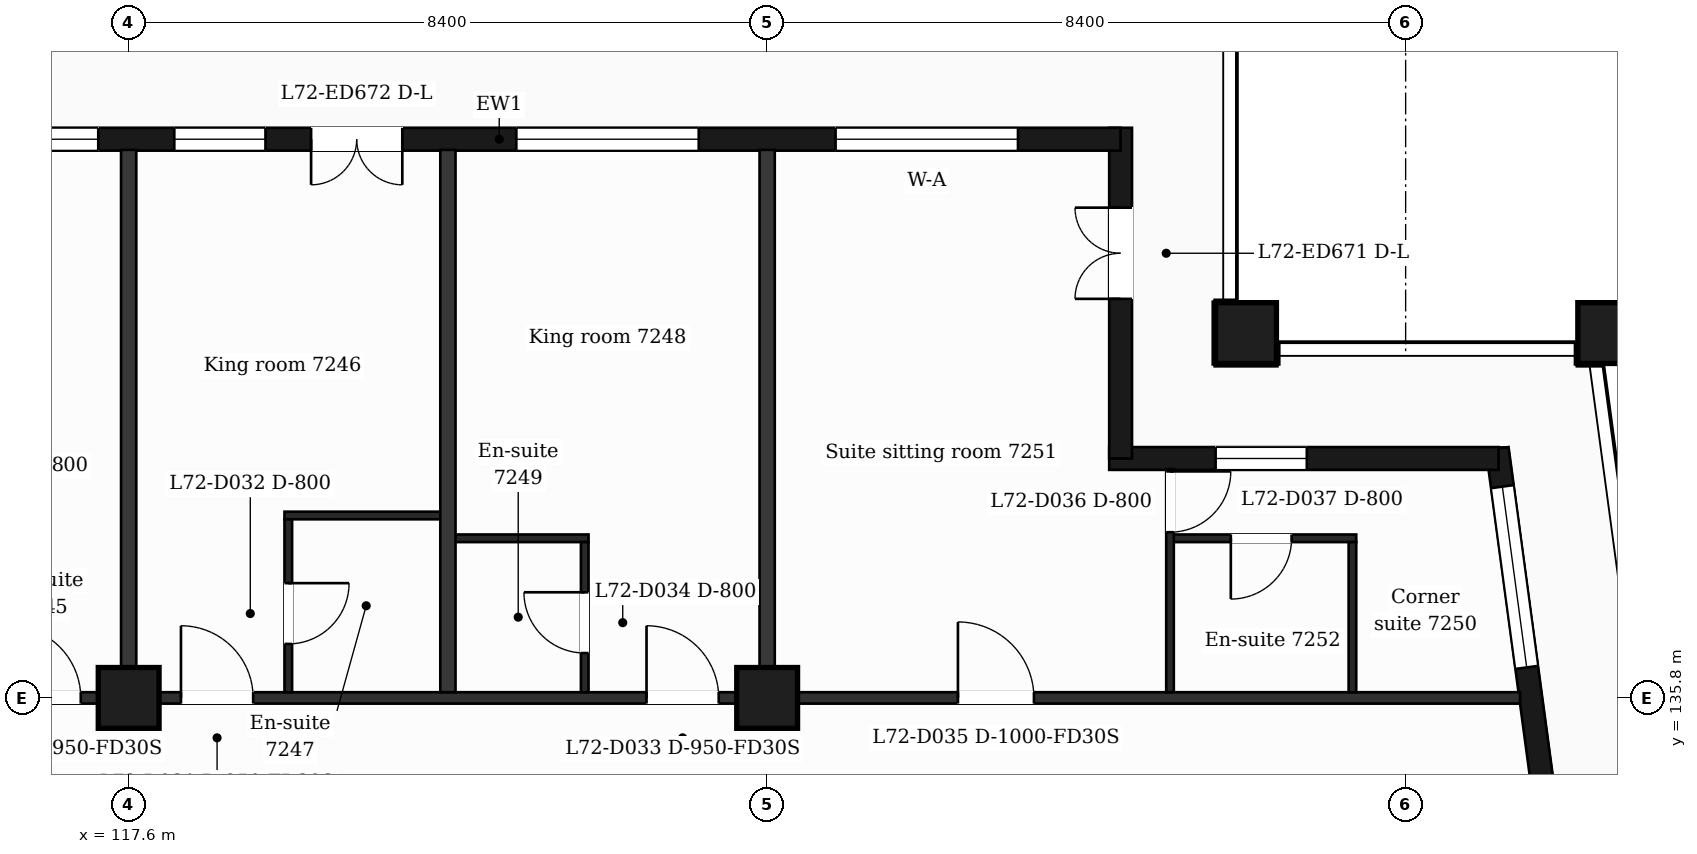
"""IFC4 building model, lengths in metres.
Left out: names, types, materials, properties, quantities, classifications, styles, units other than length and angle.
Written with IfcOpenShell. Run it as: python <this file> out.ifc"""

import sys

from ifc_helpers import new_model, si_unit, direction, frame, frame_2d, origin, origin_2d, place, context, subcontext, project, spatial, rectangle, extrude, element, fill, save


model = new_model("IFC4")
c1 = context("Model", 3, precision=1e-05, world=origin(), true_north=direction((0.0, 1.0)))
c2 = subcontext(c1, "Body", "Model", "MODEL_VIEW")
j1 = project(units=[si_unit("LENGTHUNIT", "METRE"), si_unit("PLANEANGLEUNIT", "RADIAN")], contexts=[c1])
p1 = place(None, origin())
s1 = spatial("IfcSite", under=j1, at=p1, CompositionType="ELEMENT")
p2 = place(p1, origin())
s2 = spatial("IfcBuilding", under=s1, at=p2, CompositionType="ELEMENT")
p3 = place(p2, frame((0.0, 0.0, 296.0)))
s3 = spatial("IfcBuildingStorey", under=s2, at=p3, CompositionType="ELEMENT", Elevation=296.0)
for number, where, z_axis, x_axis in (
    (1, (132.3, 140.6, 0.0), (0.0, 0.0, 1.0), (1.0, 0.0, 0.0)),
    (2, (137.065, 140.6, 0.0), (0.0, 0.0, 1.0), (1.0, 0.0, 0.0)),
    (3, (117.6, 135.8, 0.0), (0.0, 0.0, 1.0), (1.0, 0.0, 0.0)),
    (4, (126.0, 135.8, 0.0), (0.0, 0.0, 1.0), (1.0, 0.0, 0.0)),
):
    element("IfcColumn", number, at=place(p3, frame(where, z_axis=z_axis, x_axis=x_axis)), inside=s3, PredefinedType="COLUMN", context=c2, shape_type="SweptSolid", body=[
        extrude(rectangle(XDim=0.8, YDim=0.8, at=origin_2d()), origin(), (0.0, 0.0, 1.0), 3.7),
    ])
p4 = place(p3, frame((136.504, 132.4, 0.0), z_axis=(0.0, 0.0, 1.0), x_axis=(-0.133399697462, 0.99106231929, 0.0)))
e5 = element("IfcWall", 5, at=p4, inside=s3, PredefinedType="SOLIDWALL", context=c2, shape_type="SweptSolid", body=[
    extrude(rectangle(XDim=6.74, YDim=0.3, at=frame_2d((3.37, 0.0))), origin(), (0.0, 0.0, 1.0), 3.38),
])
p5 = place(p4, frame((1.115, 0.0, 0.0)))
e6 = element("IfcOpeningElement", 6, at=p5, cuts=e5, PredefinedType="OPENING", context=c2, shape_type="SweptSolid", body=[
    extrude(rectangle(XDim=1.2, YDim=2.4, at=frame_2d((0.6, 1.2))), frame((0.0, 0.16, 0.0), z_axis=(0.0, -1.0, 0.0), x_axis=(1.0, 0.0, 0.0)), (0.0, 0.0, 1.0), 0.32),
])
p6 = place(p4, frame((3.835, 0.0, 0.9)))
e7 = element("IfcOpeningElement", 7, at=p6, cuts=e5, PredefinedType="OPENING", context=c2, shape_type="SweptSolid", body=[
    extrude(rectangle(XDim=2.4, YDim=2.1, at=frame_2d((1.2, 1.05))), frame((0.0, 0.16, 0.0), z_axis=(0.0, -1.0, 0.0), x_axis=(1.0, 0.0, 0.0)), (0.0, 0.0, 1.0), 0.32),
])
p7 = place(p3, frame((135.623, 138.95, 0.0), z_axis=(0.0, 0.0, 1.0), x_axis=(-1.0, 0.0, 0.0)))
e8 = element("IfcWall", 8, at=p7, inside=s3, PredefinedType="SOLIDWALL", context=c2, shape_type="SweptSolid", body=[
    extrude(rectangle(XDim=5.123, YDim=0.3, at=frame_2d((2.561, 0.0))), origin(), (0.0, 0.0, 1.0), 3.38),
])
p8 = place(p7, frame((2.523, 0.0, 0.9)))
e9 = element("IfcOpeningElement", 9, at=p8, cuts=e8, PredefinedType="OPENING", context=c2, shape_type="SweptSolid", body=[
    extrude(rectangle(XDim=1.2, YDim=2.1, at=frame_2d((0.6, 1.05))), frame((0.0, 0.16, 0.0), z_axis=(0.0, -1.0, 0.0), x_axis=(1.0, 0.0, 0.0)), (0.0, 0.0, 1.0), 0.32),
])
p9 = place(p3, frame((130.65, 138.95, 0.0), z_axis=(0.0, 0.0, 1.0), x_axis=(0.0, 1.0, 0.0)))
e10 = element("IfcWall", 10, at=p9, inside=s3, PredefinedType="SOLIDWALL", context=c2, shape_type="SweptSolid", body=[
    extrude(rectangle(XDim=4.35, YDim=0.3, at=frame_2d((2.175, 0.0))), origin(), (0.0, 0.0, 1.0), 3.38),
])
p10 = place(p9, frame((2.1, 0.0, 0.0)))
e11 = element("IfcOpeningElement", 11, at=p10, cuts=e10, PredefinedType="OPENING", context=c2, shape_type="SweptSolid", body=[
    extrude(rectangle(XDim=1.2, YDim=2.4, at=frame_2d((0.6, 1.2))), frame((0.0, 0.16, 0.0), z_axis=(0.0, -1.0, 0.0), x_axis=(1.0, 0.0, 0.0)), (0.0, 0.0, 1.0), 0.32),
])
p11 = place(p3, frame((130.65, 143.15, 0.0), z_axis=(0.0, 0.0, 1.0), x_axis=(-1.0, 0.0, 0.0)))
e12 = element("IfcWall", 12, at=p11, inside=s3, PredefinedType="SOLIDWALL", context=c2, shape_type="SweptSolid", body=[
    extrude(rectangle(XDim=16.35, YDim=0.3, at=frame_2d((8.175, 0.0))), origin(), (0.0, 0.0, 1.0), 3.38),
])
p12 = place(p11, frame((1.35, 0.0, 0.9)))
e13 = element("IfcOpeningElement", 13, at=p12, cuts=e12, PredefinedType="OPENING", context=c2, shape_type="SweptSolid", body=[
    extrude(rectangle(XDim=2.4, YDim=2.1, at=frame_2d((1.2, 1.05))), frame((0.0, 0.16, 0.0), z_axis=(0.0, -1.0, 0.0), x_axis=(1.0, 0.0, 0.0)), (0.0, 0.0, 1.0), 0.32),
])
p13 = place(p11, frame((5.55, 0.0, 0.9)))
e14 = element("IfcOpeningElement", 14, at=p13, cuts=e12, PredefinedType="OPENING", context=c2, shape_type="SweptSolid", body=[
    extrude(rectangle(XDim=2.4, YDim=2.1, at=frame_2d((1.2, 1.05))), frame((0.0, 0.16, 0.0), z_axis=(0.0, -1.0, 0.0), x_axis=(1.0, 0.0, 0.0)), (0.0, 0.0, 1.0), 0.32),
])
p14 = place(p11, frame((9.45, 0.0, 0.0)))
e15 = element("IfcOpeningElement", 15, at=p14, cuts=e12, PredefinedType="OPENING", context=c2, shape_type="SweptSolid", body=[
    extrude(rectangle(XDim=1.2, YDim=2.4, at=frame_2d((0.6, 1.2))), frame((0.0, 0.16, 0.0), z_axis=(0.0, -1.0, 0.0), x_axis=(1.0, 0.0, 0.0)), (0.0, 0.0, 1.0), 0.32),
])
p15 = place(p11, frame((11.25, 0.0, 0.9)))
e16 = element("IfcOpeningElement", 16, at=p15, cuts=e12, PredefinedType="OPENING", context=c2, shape_type="SweptSolid", body=[
    extrude(rectangle(XDim=1.2, YDim=2.1, at=frame_2d((0.6, 1.05))), frame((0.0, 0.16, 0.0), z_axis=(0.0, -1.0, 0.0), x_axis=(1.0, 0.0, 0.0)), (0.0, 0.0, 1.0), 0.32),
])
p16 = place(p11, frame((13.45, 0.0, 0.9)))
e17 = element("IfcOpeningElement", 17, at=p16, cuts=e12, PredefinedType="OPENING", context=c2, shape_type="SweptSolid", body=[
    extrude(rectangle(XDim=2.4, YDim=2.1, at=frame_2d((1.2, 1.05))), frame((0.0, 0.16, 0.0), z_axis=(0.0, -1.0, 0.0), x_axis=(1.0, 0.0, 0.0)), (0.0, 0.0, 1.0), 0.32),
])
p17 = place(p3, frame((90.895, 135.8, 0.0), z_axis=(0.0, 0.0, 1.0), x_axis=(1.0, 0.0, 0.0)))
e18 = element("IfcWall", 18, at=p17, inside=s3, PredefinedType="PARTITIONING", context=c2, shape_type="SweptSolid", body=[
    extrude(rectangle(XDim=45.011, YDim=0.15, at=frame_2d((22.505, 0.0))), origin(), (0.0, 0.0, 1.0), 3.38),
])
p18 = place(p17, frame((6.906, 0.0, 0.0)))
e19 = element("IfcOpeningElement", 19, at=p18, cuts=e18, PredefinedType="OPENING", context=c2, shape_type="SweptSolid", body=[
    extrude(rectangle(XDim=1.0, YDim=2.1, at=frame_2d((0.5, 1.05))), frame((0.0, 0.085, 0.0), z_axis=(0.0, -1.0, 0.0), x_axis=(1.0, 0.0, 0.0)), (0.0, 0.0, 1.0), 0.17),
])
p19 = place(p17, frame((10.555, 0.0, 0.0)))
e20 = element("IfcOpeningElement", 20, at=p19, cuts=e18, PredefinedType="OPENING", context=c2, shape_type="SweptSolid", body=[
    extrude(rectangle(XDim=1.0, YDim=2.1, at=frame_2d((0.5, 1.05))), frame((0.0, 0.085, 0.0), z_axis=(0.0, -1.0, 0.0), x_axis=(1.0, 0.0, 0.0)), (0.0, 0.0, 1.0), 0.17),
])
p20 = place(p17, frame((16.719, 0.0, 0.0)))
e21 = element("IfcOpeningElement", 21, at=p20, cuts=e18, PredefinedType="OPENING", context=c2, shape_type="SweptSolid", body=[
    extrude(rectangle(XDim=0.95, YDim=2.1, at=frame_2d((0.475, 1.05))), frame((0.0, 0.085, 0.0), z_axis=(0.0, -1.0, 0.0), x_axis=(1.0, 0.0, 0.0)), (0.0, 0.0, 1.0), 0.17),
])
p21 = place(p17, frame((21.281, 0.0, 0.0)))
e22 = element("IfcOpeningElement", 22, at=p21, cuts=e18, PredefinedType="OPENING", context=c2, shape_type="SweptSolid", body=[
    extrude(rectangle(XDim=0.95, YDim=2.1, at=frame_2d((0.475, 1.05))), frame((0.0, 0.085, 0.0), z_axis=(0.0, -1.0, 0.0), x_axis=(1.0, 0.0, 0.0)), (0.0, 0.0, 1.0), 0.17),
])
p22 = place(p17, frame((25.125, 0.0, 0.0)))
e23 = element("IfcOpeningElement", 23, at=p22, cuts=e18, PredefinedType="OPENING", context=c2, shape_type="SweptSolid", body=[
    extrude(rectangle(XDim=0.95, YDim=2.1, at=frame_2d((0.475, 1.05))), frame((0.0, 0.085, 0.0), z_axis=(0.0, -1.0, 0.0), x_axis=(1.0, 0.0, 0.0)), (0.0, 0.0, 1.0), 0.17),
])
p23 = place(p17, frame((27.393, 0.0, 0.0)))
e24 = element("IfcOpeningElement", 24, at=p23, cuts=e18, PredefinedType="OPENING", context=c2, shape_type="SweptSolid", body=[
    extrude(rectangle(XDim=0.95, YDim=2.1, at=frame_2d((0.475, 1.05))), frame((0.0, 0.085, 0.0), z_axis=(0.0, -1.0, 0.0), x_axis=(1.0, 0.0, 0.0)), (0.0, 0.0, 1.0), 0.17),
])
p24 = place(p17, frame((33.518, 0.0, 0.0)))
e25 = element("IfcOpeningElement", 25, at=p24, cuts=e18, PredefinedType="OPENING", context=c2, shape_type="SweptSolid", body=[
    extrude(rectangle(XDim=0.95, YDim=2.1, at=frame_2d((0.475, 1.05))), frame((0.0, 0.085, 0.0), z_axis=(0.0, -1.0, 0.0), x_axis=(1.0, 0.0, 0.0)), (0.0, 0.0, 1.0), 0.17),
])
p25 = place(p17, frame((37.615, 0.0, 0.0)))
e26 = element("IfcOpeningElement", 26, at=p25, cuts=e18, PredefinedType="OPENING", context=c2, shape_type="SweptSolid", body=[
    extrude(rectangle(XDim=1.0, YDim=2.1, at=frame_2d((0.5, 1.05))), frame((0.0, 0.085, 0.0), z_axis=(0.0, -1.0, 0.0), x_axis=(1.0, 0.0, 0.0)), (0.0, 0.0, 1.0), 0.17),
])
p26 = place(p3, frame((121.8, 137.9, 0.0), z_axis=(0.0, 0.0, 1.0), x_axis=(1.0, 0.0, 0.0)))
e27 = element("IfcWall", 27, at=p26, inside=s3, PredefinedType="PARTITIONING", context=c2, shape_type="SweptSolid", body=[
    extrude(rectangle(XDim=1.85, YDim=0.1, at=frame_2d((0.925, 0.0))), origin(), (0.0, 0.0, 1.0), 3.38),
])
p27 = place(p3, frame((131.3, 137.9, 0.0), z_axis=(0.0, 0.0, 1.0), x_axis=(1.0, 0.0, 0.0)))
e28 = element("IfcWall", 28, at=p27, inside=s3, PredefinedType="PARTITIONING", context=c2, shape_type="SweptSolid", body=[
    extrude(rectangle(XDim=2.45, YDim=0.1, at=frame_2d((1.225, 0.0))), origin(), (0.0, 0.0, 1.0), 3.38),
])
p28 = place(p27, frame((0.8, 0.0, 0.0)))
e29 = element("IfcOpeningElement", 29, at=p28, cuts=e28, PredefinedType="OPENING", context=c2, shape_type="SweptSolid", body=[
    extrude(rectangle(XDim=0.8, YDim=2.1, at=frame_2d((0.4, 1.05))), frame((0.0, 0.06, 0.0), z_axis=(0.0, -1.0, 0.0), x_axis=(1.0, 0.0, 0.0)), (0.0, 0.0, 1.0), 0.12),
])
p29 = place(p3, frame((119.65, 138.2, 0.0), z_axis=(0.0, 0.0, 1.0), x_axis=(1.0, 0.0, 0.0)))
e30 = element("IfcWall", 30, at=p29, inside=s3, PredefinedType="PARTITIONING", context=c2, shape_type="SweptSolid", body=[
    extrude(rectangle(XDim=2.15, YDim=0.1, at=frame_2d((1.075, 0.0))), origin(), (0.0, 0.0, 1.0), 3.38),
])
p30 = place(p3, frame((117.6, 135.875, 0.0), z_axis=(0.0, 0.0, 1.0), x_axis=(0.0, 1.0, 0.0)))
e31 = element("IfcWall", 31, at=p30, inside=s3, PredefinedType="PARTITIONING", context=c2, shape_type="SweptSolid", body=[
    extrude(rectangle(XDim=7.135, YDim=0.2, at=frame_2d((3.567, 0.0))), origin(), (0.0, 0.0, 1.0), 3.38),
])
p31 = place(p3, frame((119.7, 135.875, 0.0), z_axis=(0.0, 0.0, 1.0), x_axis=(0.0, 1.0, 0.0)))
e32 = element("IfcWall", 32, at=p31, inside=s3, PredefinedType="PARTITIONING", context=c2, shape_type="SweptSolid", body=[
    extrude(rectangle(XDim=2.275, YDim=0.1, at=frame_2d((1.137, 0.0))), origin(), (0.0, 0.0, 1.0), 3.38),
])
p32 = place(p31, frame((0.635, 0.0, 0.0)))
e33 = element("IfcOpeningElement", 33, at=p32, cuts=e32, PredefinedType="OPENING", context=c2, shape_type="SweptSolid", body=[
    extrude(rectangle(XDim=0.8, YDim=2.1, at=frame_2d((0.4, 1.05))), frame((0.0, 0.06, 0.0), z_axis=(0.0, -1.0, 0.0), x_axis=(1.0, 0.0, 0.0)), (0.0, 0.0, 1.0), 0.12),
])
p33 = place(p3, frame((121.8, 135.875, 0.0), z_axis=(0.0, 0.0, 1.0), x_axis=(0.0, 1.0, 0.0)))
e34 = element("IfcWall", 34, at=p33, inside=s3, PredefinedType="PARTITIONING", context=c2, shape_type="SweptSolid", body=[
    extrude(rectangle(XDim=7.135, YDim=0.2, at=frame_2d((3.567, 0.0))), origin(), (0.0, 0.0, 1.0), 3.38),
])
p34 = place(p3, frame((123.6, 135.875, 0.0), z_axis=(0.0, 0.0, 1.0), x_axis=(0.0, 1.0, 0.0)))
e35 = element("IfcWall", 35, at=p34, inside=s3, PredefinedType="PARTITIONING", context=c2, shape_type="SweptSolid", body=[
    extrude(rectangle(XDim=1.975, YDim=0.1, at=frame_2d((0.988, 0.0))), origin(), (0.0, 0.0, 1.0), 3.38),
])
p35 = place(p34, frame((0.515, 0.0, 0.0)))
e36 = element("IfcOpeningElement", 36, at=p35, cuts=e35, PredefinedType="OPENING", context=c2, shape_type="SweptSolid", body=[
    extrude(rectangle(XDim=0.8, YDim=2.1, at=frame_2d((0.4, 1.05))), frame((0.0, 0.06, 0.0), z_axis=(0.0, -1.0, 0.0), x_axis=(1.0, 0.0, 0.0)), (0.0, 0.0, 1.0), 0.12),
])
p36 = place(p3, frame((126.0, 135.875, 0.0), z_axis=(0.0, 0.0, 1.0), x_axis=(0.0, 1.0, 0.0)))
e37 = element("IfcWall", 37, at=p36, inside=s3, PredefinedType="PARTITIONING", context=c2, shape_type="SweptSolid", body=[
    extrude(rectangle(XDim=7.135, YDim=0.2, at=frame_2d((3.567, 0.0))), origin(), (0.0, 0.0, 1.0), 3.38),
])
p37 = place(p3, frame((131.3, 135.875, 0.0), z_axis=(0.0, 0.0, 1.0), x_axis=(0.0, 1.0, 0.0)))
e38 = element("IfcWall", 38, at=p37, inside=s3, PredefinedType="PARTITIONING", context=c2, shape_type="SweptSolid", body=[
    extrude(rectangle(XDim=2.935, YDim=0.1, at=frame_2d((1.468, 0.0))), origin(), (0.0, 0.0, 1.0), 3.38),
])
p38 = place(p37, frame((2.105, 0.0, 0.0)))
e39 = element("IfcOpeningElement", 39, at=p38, cuts=e38, PredefinedType="OPENING", context=c2, shape_type="SweptSolid", body=[
    extrude(rectangle(XDim=0.8, YDim=2.1, at=frame_2d((0.4, 1.05))), frame((0.0, 0.06, 0.0), z_axis=(0.0, -1.0, 0.0), x_axis=(1.0, 0.0, 0.0)), (0.0, 0.0, 1.0), 0.12),
])
p39 = place(p3, frame((133.7, 135.875, 0.0), z_axis=(0.0, 0.0, 1.0), x_axis=(0.0, 1.0, 0.0)))
e40 = element("IfcWall", 40, at=p39, inside=s3, PredefinedType="PARTITIONING", context=c2, shape_type="SweptSolid", body=[
    extrude(rectangle(XDim=1.975, YDim=0.1, at=frame_2d((0.988, 0.0))), origin(), (0.0, 0.0, 1.0), 3.38),
])
p40 = place(p6, origin())
e41 = element("IfcWindow", 41, at=p40, inside=s3, PartitioningType="SINGLE_PANEL", PredefinedType="WINDOW", context=c2, shape_type="SweptSolid", body=[
    extrude(rectangle(XDim=2.4, YDim=2.1, at=frame_2d((1.2, 1.05))), frame((0.0, 0.03, 0.0), z_axis=(0.0, -1.0, 0.0), x_axis=(1.0, 0.0, 0.0)), (0.0, 0.0, 1.0), 0.06),
])
fill(e7, e41)
p41 = place(p8, origin())
e42 = element("IfcWindow", 42, at=p41, inside=s3, PartitioningType="SINGLE_PANEL", PredefinedType="WINDOW", context=c2, shape_type="SweptSolid", body=[
    extrude(rectangle(XDim=1.2, YDim=2.1, at=frame_2d((0.6, 1.05))), frame((0.0, 0.03, 0.0), z_axis=(0.0, -1.0, 0.0), x_axis=(1.0, 0.0, 0.0)), (0.0, 0.0, 1.0), 0.06),
])
fill(e9, e42)
p42 = place(p10, origin())
e43 = element("IfcDoor", 43, at=p42, inside=s3, OperationType="DOUBLE_DOOR_SINGLE_SWING", PredefinedType="DOOR", context=c2, shape_type="SweptSolid", body=[
    extrude(rectangle(XDim=1.2, YDim=2.4, at=frame_2d((0.6, 1.2))), frame((0.0, 0.025, 0.0), z_axis=(0.0, -1.0, 0.0), x_axis=(1.0, 0.0, 0.0)), (0.0, 0.0, 1.0), 0.05),
])
fill(e11, e43)
p43 = place(p12, origin())
e44 = element("IfcWindow", 44, at=p43, inside=s3, PartitioningType="SINGLE_PANEL", PredefinedType="WINDOW", context=c2, shape_type="SweptSolid", body=[
    extrude(rectangle(XDim=2.4, YDim=2.1, at=frame_2d((1.2, 1.05))), frame((0.0, 0.03, 0.0), z_axis=(0.0, -1.0, 0.0), x_axis=(1.0, 0.0, 0.0)), (0.0, 0.0, 1.0), 0.06),
])
fill(e13, e44)
p44 = place(p13, origin())
e45 = element("IfcWindow", 45, at=p44, inside=s3, PartitioningType="SINGLE_PANEL", PredefinedType="WINDOW", context=c2, shape_type="SweptSolid", body=[
    extrude(rectangle(XDim=2.4, YDim=2.1, at=frame_2d((1.2, 1.05))), frame((0.0, 0.03, 0.0), z_axis=(0.0, -1.0, 0.0), x_axis=(1.0, 0.0, 0.0)), (0.0, 0.0, 1.0), 0.06),
])
fill(e14, e45)
p45 = place(p14, origin())
e46 = element("IfcDoor", 46, at=p45, inside=s3, OperationType="DOUBLE_DOOR_SINGLE_SWING", PredefinedType="DOOR", context=c2, shape_type="SweptSolid", body=[
    extrude(rectangle(XDim=1.2, YDim=2.4, at=frame_2d((0.6, 1.2))), frame((0.0, 0.025, 0.0), z_axis=(0.0, -1.0, 0.0), x_axis=(1.0, 0.0, 0.0)), (0.0, 0.0, 1.0), 0.05),
])
fill(e15, e46)
p46 = place(p15, origin())
e47 = element("IfcWindow", 47, at=p46, inside=s3, PartitioningType="SINGLE_PANEL", PredefinedType="WINDOW", context=c2, shape_type="SweptSolid", body=[
    extrude(rectangle(XDim=1.2, YDim=2.1, at=frame_2d((0.6, 1.05))), frame((0.0, 0.03, 0.0), z_axis=(0.0, -1.0, 0.0), x_axis=(1.0, 0.0, 0.0)), (0.0, 0.0, 1.0), 0.06),
])
fill(e16, e47)
p47 = place(p16, origin())
e48 = element("IfcWindow", 48, at=p47, inside=s3, PartitioningType="SINGLE_PANEL", PredefinedType="WINDOW", context=c2, shape_type="SweptSolid", body=[
    extrude(rectangle(XDim=2.4, YDim=2.1, at=frame_2d((1.2, 1.05))), frame((0.0, 0.03, 0.0), z_axis=(0.0, -1.0, 0.0), x_axis=(1.0, 0.0, 0.0)), (0.0, 0.0, 1.0), 0.06),
])
fill(e17, e48)
p48 = place(p22, origin())
e49 = element("IfcDoor", 49, at=p48, inside=s3, OperationType="SINGLE_SWING_LEFT", PredefinedType="DOOR", context=c2, shape_type="SweptSolid", body=[
    extrude(rectangle(XDim=0.95, YDim=2.1, at=frame_2d((0.475, 1.05))), frame((0.0, 0.025, 0.0), z_axis=(0.0, -1.0, 0.0), x_axis=(1.0, 0.0, 0.0)), (0.0, 0.0, 1.0), 0.05),
])
fill(e23, e49)
p49 = place(p23, origin())
e50 = element("IfcDoor", 50, at=p49, inside=s3, OperationType="SINGLE_SWING_LEFT", PredefinedType="DOOR", context=c2, shape_type="SweptSolid", body=[
    extrude(rectangle(XDim=0.95, YDim=2.1, at=frame_2d((0.475, 1.05))), frame((0.0, 0.025, 0.0), z_axis=(0.0, -1.0, 0.0), x_axis=(1.0, 0.0, 0.0)), (0.0, 0.0, 1.0), 0.05),
])
fill(e24, e50)
p50 = place(p32, origin())
e51 = element("IfcDoor", 51, at=p50, inside=s3, OperationType="SINGLE_SWING_RIGHT", PredefinedType="DOOR", context=c2, shape_type="SweptSolid", body=[
    extrude(rectangle(XDim=0.8, YDim=2.1, at=frame_2d((0.4, 1.05))), frame((0.0, 0.025, 0.0), z_axis=(0.0, -1.0, 0.0), x_axis=(1.0, 0.0, 0.0)), (0.0, 0.0, 1.0), 0.05),
])
fill(e33, e51)
p51 = place(p24, origin())
e52 = element("IfcDoor", 52, at=p51, inside=s3, OperationType="SINGLE_SWING_LEFT", PredefinedType="DOOR", context=c2, shape_type="SweptSolid", body=[
    extrude(rectangle(XDim=0.95, YDim=2.1, at=frame_2d((0.475, 1.05))), frame((0.0, 0.025, 0.0), z_axis=(0.0, -1.0, 0.0), x_axis=(1.0, 0.0, 0.0)), (0.0, 0.0, 1.0), 0.05),
])
fill(e25, e52)
p52 = place(p35, origin())
e53 = element("IfcDoor", 53, at=p52, inside=s3, OperationType="SINGLE_SWING_RIGHT", PredefinedType="DOOR", context=c2, shape_type="SweptSolid", body=[
    extrude(rectangle(XDim=0.8, YDim=2.1, at=frame_2d((0.4, 1.05))), frame((0.0, 0.025, 0.0), z_axis=(0.0, -1.0, 0.0), x_axis=(1.0, 0.0, 0.0)), (0.0, 0.0, 1.0), 0.05),
])
fill(e36, e53)
p53 = place(p25, origin())
e54 = element("IfcDoor", 54, at=p53, inside=s3, OperationType="SINGLE_SWING_LEFT", PredefinedType="DOOR", context=c2, shape_type="SweptSolid", body=[
    extrude(rectangle(XDim=1.0, YDim=2.1, at=frame_2d((0.5, 1.05))), frame((0.0, 0.025, 0.0), z_axis=(0.0, -1.0, 0.0), x_axis=(1.0, 0.0, 0.0)), (0.0, 0.0, 1.0), 0.05),
])
fill(e26, e54)
p54 = place(p38, origin())
e55 = element("IfcDoor", 55, at=p54, inside=s3, OperationType="SINGLE_SWING_RIGHT", PredefinedType="DOOR", context=c2, shape_type="SweptSolid", body=[
    extrude(rectangle(XDim=0.8, YDim=2.1, at=frame_2d((0.4, 1.05))), frame((0.0, 0.025, 0.0), z_axis=(0.0, -1.0, 0.0), x_axis=(1.0, 0.0, 0.0)), (0.0, 0.0, 1.0), 0.05),
])
fill(e39, e55)
p55 = place(p28, origin())
e56 = element("IfcDoor", 56, at=p55, inside=s3, OperationType="SINGLE_SWING_LEFT", PredefinedType="DOOR", context=c2, shape_type="SweptSolid", body=[
    extrude(rectangle(XDim=0.8, YDim=2.1, at=frame_2d((0.4, 1.05))), frame((0.0, 0.025, 0.0), z_axis=(0.0, -1.0, 0.0), x_axis=(1.0, 0.0, 0.0)), (0.0, 0.0, 1.0), 0.05),
])
fill(e29, e56)
save(model, sys.argv[1])
